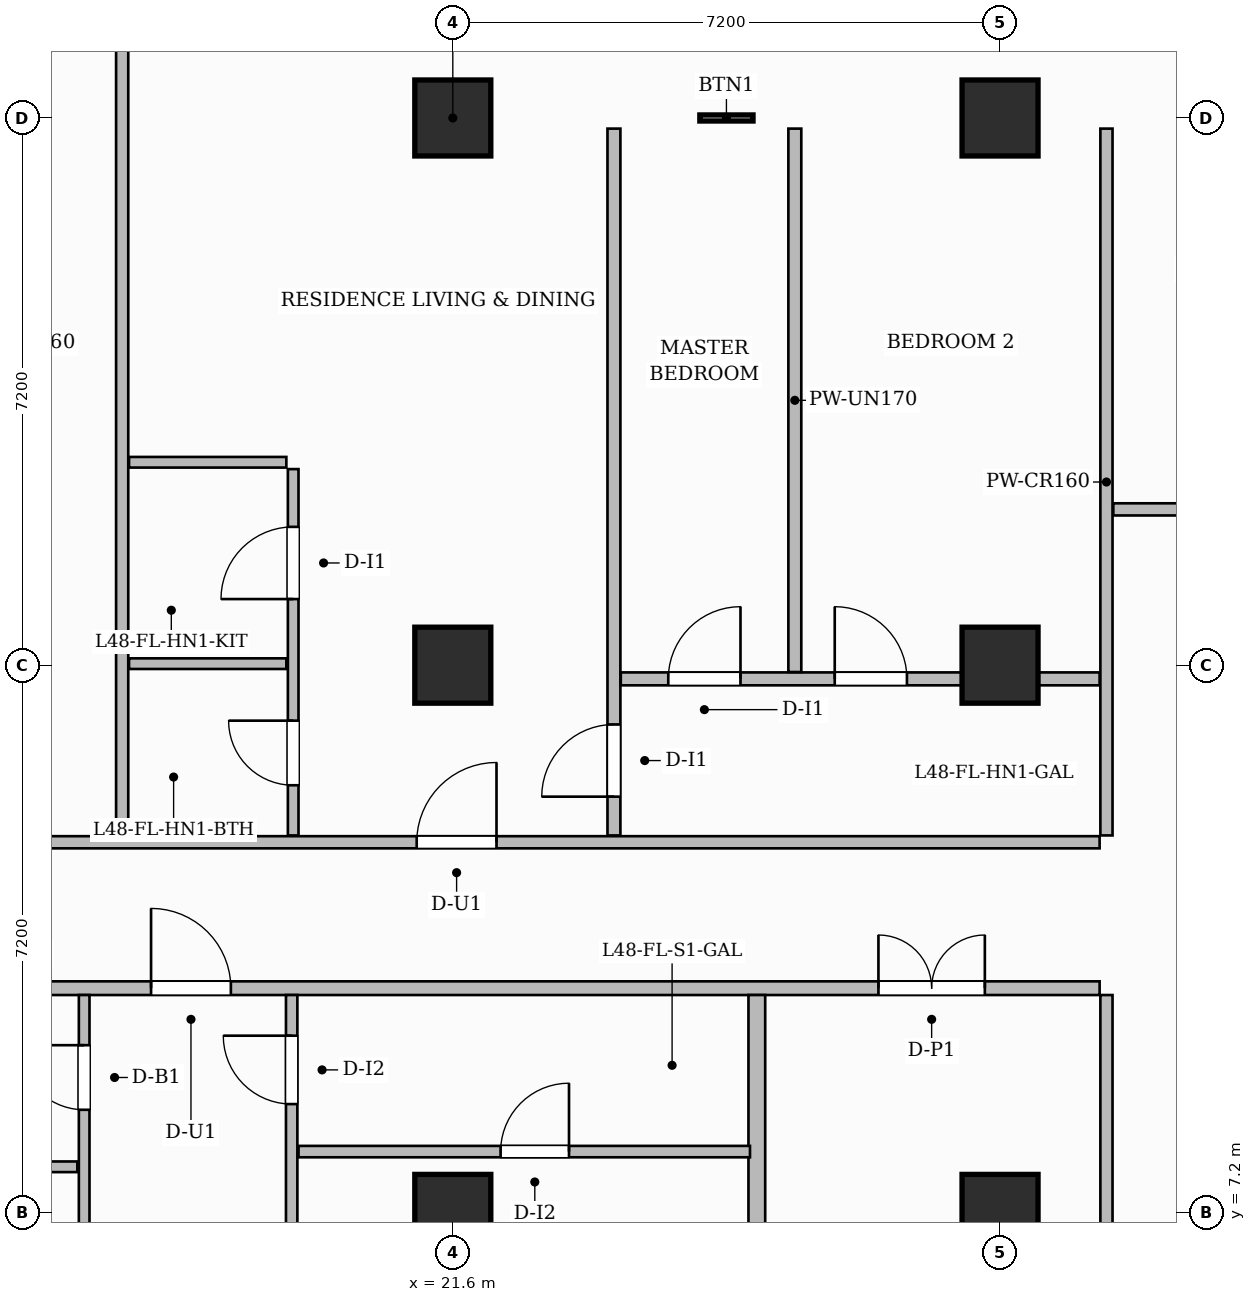
"""IFC4 building model, lengths in metres.
Left out: names, types, materials, properties, quantities, classifications, styles, units other than length and angle.
Written with IfcOpenShell. Run it as: python <this file> out.ifc"""

import sys

from ifc_helpers import new_model, si_unit, direction, frame, frame_2d, origin, origin_2d, place, context, subcontext, project, spatial, rectangle, extrude, source, transform, mapped, element, fill, save


model = new_model("IFC4")
c1 = context("Model", 3, precision=1e-05, world=origin(), true_north=direction((0.0, 1.0)))
c2 = subcontext(c1, "Body", "Model", "MODEL_VIEW")
j1 = project(units=[si_unit("LENGTHUNIT", "METRE"), si_unit("PLANEANGLEUNIT", "RADIAN")], contexts=[c1])
p1 = place(None, origin())
s1 = spatial("IfcSite", under=j1, at=p1, CompositionType="ELEMENT")
p2 = place(p1, origin())
s2 = spatial("IfcBuilding", under=s1, at=p2, CompositionType="ELEMENT")
p3 = place(p2, frame((0.0, 0.0, 192.65)))
s3 = spatial("IfcBuildingStorey", under=s2, at=p3, CompositionType="ELEMENT", Elevation=192.65)
m1 = source(origin(), c2, "Body", "SweptSolid", [
    extrude(rectangle(XDim=1.0, YDim=1.0, at=origin_2d()), origin(), (0.0, 0.0, 1.0), 3.85),
])
for number, where, z_axis, x_axis in (
    (1, (21.6, 7.2, 0.0), (0.0, 0.0, 1.0), (1.0, 0.0, 0.0)),
    (2, (21.6, 14.4, 0.0), (0.0, 0.0, 1.0), (1.0, 0.0, 0.0)),
    (3, (21.6, 21.6, 0.0), (0.0, 0.0, 1.0), (1.0, 0.0, 0.0)),
    (4, (28.8, 7.2, 0.0), (0.0, 0.0, 1.0), (1.0, 0.0, 0.0)),
    (5, (28.8, 14.4, 0.0), (0.0, 0.0, 1.0), (1.0, 0.0, 0.0)),
    (6, (28.8, 21.6, 0.0), (0.0, 0.0, 1.0), (1.0, 0.0, 0.0)),
):
    element("IfcColumn", number, at=place(p3, frame(where, z_axis=z_axis, x_axis=x_axis)), inside=s3, PredefinedType="COLUMN", context=c2, shape_type="MappedRepresentation", body=[
        mapped(m1, transform((0.0, 0.0, 0.0), scale=1.0)),
    ])
p4 = place(p3, frame((14.568, 10.15, 0.0), z_axis=(0.0, 0.0, 1.0), x_axis=(1.0, 0.0, 0.0)))
e7 = element("IfcWall", 7, at=p4, inside=s3, PredefinedType="PARTITIONING", context=c2, shape_type="SweptSolid", body=[
    extrude(rectangle(XDim=15.542, YDim=0.18, at=frame_2d((7.771, 0.0))), origin(), (0.0, 0.0, 1.0), 3.55),
])
p5 = place(p4, frame((3.062, 0.0, 0.0)))
e8 = element("IfcOpeningElement", 8, at=p5, cuts=e7, PredefinedType="OPENING", context=c2, shape_type="SweptSolid", body=[
    extrude(rectangle(XDim=1.05, YDim=2.25, at=frame_2d((0.525, 1.125))), frame((0.0, 0.1, 0.0), z_axis=(0.0, -1.0, 0.0), x_axis=(1.0, 0.0, 0.0)), (0.0, 0.0, 1.0), 0.2),
])
p6 = place(p4, frame((12.632, 0.0, 0.0)))
e9 = element("IfcOpeningElement", 9, at=p6, cuts=e7, PredefinedType="OPENING", context=c2, shape_type="SweptSolid", body=[
    extrude(rectangle(XDim=1.4, YDim=2.35, at=frame_2d((0.7, 1.175))), frame((0.0, 0.1, 0.0), z_axis=(0.0, -1.0, 0.0), x_axis=(1.0, 0.0, 0.0)), (0.0, 0.0, 1.0), 0.2),
])
p7 = place(p3, frame((14.568, 12.07, 0.0), z_axis=(0.0, 0.0, 1.0), x_axis=(1.0, 0.0, 0.0)))
e10 = element("IfcWall", 10, at=p7, inside=s3, PredefinedType="PARTITIONING", context=c2, shape_type="SweptSolid", body=[
    extrude(rectangle(XDim=15.542, YDim=0.16, at=frame_2d((7.771, 0.0))), origin(), (0.0, 0.0, 1.0), 3.55),
])
p8 = place(p7, frame((6.557, 0.0, 0.0)))
e11 = element("IfcOpeningElement", 11, at=p8, cuts=e10, PredefinedType="OPENING", context=c2, shape_type="SweptSolid", body=[
    extrude(rectangle(XDim=1.05, YDim=2.25, at=frame_2d((0.525, 1.125))), frame((0.0, 0.09, 0.0), z_axis=(0.0, -1.0, 0.0), x_axis=(1.0, 0.0, 0.0)), (0.0, 0.0, 1.0), 0.18),
])
p9 = place(p3, frame((30.2, 12.16, 0.0), z_axis=(0.0, 0.0, 1.0), x_axis=(0.0, 1.0, 0.0)))
e12 = element("IfcWall", 12, at=p9, inside=s3, PredefinedType="PARTITIONING", context=c2, shape_type="SweptSolid", body=[
    extrude(rectangle(XDim=9.3, YDim=0.16, at=frame_2d((4.65, 0.0))), origin(), (0.0, 0.0, 1.0), 3.55),
])
p10 = place(p3, frame((30.29, 16.45, 0.0), z_axis=(0.0, 0.0, 1.0), x_axis=(1.0, 0.0, 0.0)))
e13 = element("IfcWall", 13, at=p10, inside=s3, PredefinedType="PARTITIONING", context=c2, shape_type="SweptSolid", body=[
    extrude(rectangle(XDim=19.37, YDim=0.16, at=frame_2d((9.685, 0.0))), origin(), (0.0, 0.0, 1.0), 3.55),
])
p11 = place(p10, frame((1.285, 0.0, 0.0)))
e14 = element("IfcOpeningElement", 14, at=p11, cuts=e13, PredefinedType="OPENING", context=c2, shape_type="SweptSolid", body=[
    extrude(rectangle(XDim=0.85, YDim=2.1, at=frame_2d((0.425, 1.05))), frame((0.0, 0.09, 0.0), z_axis=(0.0, -1.0, 0.0), x_axis=(1.0, 0.0, 0.0)), (0.0, 0.0, 1.0), 0.18),
])
p12 = place(p10, frame((10.66, 0.0, 0.0)))
e15 = element("IfcOpeningElement", 15, at=p12, cuts=e13, PredefinedType="OPENING", context=c2, shape_type="SweptSolid", body=[
    extrude(rectangle(XDim=1.6, YDim=2.4, at=frame_2d((0.8, 1.2))), frame((0.0, 0.09, 0.0), z_axis=(0.0, -1.0, 0.0), x_axis=(1.0, 0.0, 0.0)), (0.0, 0.0, 1.0), 0.18),
])
p13 = place(p3, frame((30.2, 0.168, 0.0), z_axis=(0.0, 0.0, 1.0), x_axis=(0.0, 1.0, 0.0)))
e16 = element("IfcWall", 16, at=p13, inside=s3, PredefinedType="PARTITIONING", context=c2, shape_type="SweptSolid", body=[
    extrude(rectangle(XDim=9.892, YDim=0.16, at=frame_2d((4.946, 0.0))), origin(), (0.0, 0.0, 1.0), 3.55),
])
p14 = place(p13, frame((1.957, 0.0, 0.0)))
e17 = element("IfcOpeningElement", 17, at=p14, cuts=e16, PredefinedType="OPENING", context=c2, shape_type="SweptSolid", body=[
    extrude(rectangle(XDim=1.05, YDim=2.15, at=frame_2d((0.525, 1.075))), frame((0.0, 0.09, 0.0), z_axis=(0.0, -1.0, 0.0), x_axis=(1.0, 0.0, 0.0)), (0.0, 0.0, 1.0), 0.18),
])
p15 = place(p3, frame((25.6, 0.168, 0.0), z_axis=(0.0, 0.0, 1.0), x_axis=(0.0, 1.0, 0.0)))
e18 = element("IfcWall", 18, at=p15, inside=s3, PredefinedType="PARTITIONING", context=c2, shape_type="SweptSolid", body=[
    extrude(rectangle(XDim=9.892, YDim=0.22, at=frame_2d((4.946, 0.0))), origin(), (0.0, 0.0, 1.0), 3.55),
])
p16 = place(p3, frame((16.75, 5.24, 0.0), z_axis=(0.0, 0.0, 1.0), x_axis=(0.0, 1.0, 0.0)))
e19 = element("IfcWall", 19, at=p16, inside=s3, PredefinedType="PARTITIONING", context=c2, shape_type="SweptSolid", body=[
    extrude(rectangle(XDim=4.82, YDim=0.14, at=frame_2d((2.41, 0.0))), origin(), (0.0, 0.0, 1.0), 3.55),
])
p17 = place(p16, frame((0.785, 0.0, 0.0)))
e20 = element("IfcOpeningElement", 20, at=p17, cuts=e19, PredefinedType="OPENING", context=c2, shape_type="SweptSolid", body=[
    extrude(rectangle(XDim=0.9, YDim=2.15, at=frame_2d((0.45, 1.075))), frame((0.0, 0.08, 0.0), z_axis=(0.0, -1.0, 0.0), x_axis=(1.0, 0.0, 0.0)), (0.0, 0.0, 1.0), 0.16),
])
p18 = place(p16, frame((3.31, 0.0, 0.0)))
e21 = element("IfcOpeningElement", 21, at=p18, cuts=e19, PredefinedType="OPENING", context=c2, shape_type="SweptSolid", body=[
    extrude(rectangle(XDim=0.85, YDim=2.1, at=frame_2d((0.425, 1.05))), frame((0.0, 0.08, 0.0), z_axis=(0.0, -1.0, 0.0), x_axis=(1.0, 0.0, 0.0)), (0.0, 0.0, 1.0), 0.16),
])
p19 = place(p3, frame((14.568, 7.8, 0.0), z_axis=(0.0, 0.0, 1.0), x_axis=(1.0, 0.0, 0.0)))
e22 = element("IfcWall", 22, at=p19, inside=s3, PredefinedType="PARTITIONING", context=c2, shape_type="SweptSolid", body=[
    extrude(rectangle(XDim=2.092, YDim=0.14, at=frame_2d((1.046, 0.0))), origin(), (0.0, 0.0, 1.0), 3.55),
])
p20 = place(p3, frame((19.48, 0.168, 0.0), z_axis=(0.0, 0.0, 1.0), x_axis=(0.0, 1.0, 0.0)))
e23 = element("IfcWall", 23, at=p20, inside=s3, PredefinedType="PARTITIONING", context=c2, shape_type="SweptSolid", body=[
    extrude(rectangle(XDim=9.892, YDim=0.15, at=frame_2d((4.946, 0.0))), origin(), (0.0, 0.0, 1.0), 3.55),
])
p21 = place(p20, frame((8.457, 0.0, 0.0)))
e24 = element("IfcOpeningElement", 24, at=p21, cuts=e23, PredefinedType="OPENING", context=c2, shape_type="SweptSolid", body=[
    extrude(rectangle(XDim=0.9, YDim=2.15, at=frame_2d((0.45, 1.075))), frame((0.0, 0.085, 0.0), z_axis=(0.0, -1.0, 0.0), x_axis=(1.0, 0.0, 0.0)), (0.0, 0.0, 1.0), 0.17),
])
p22 = place(p3, frame((19.57, 8.0, 0.0), z_axis=(0.0, 0.0, 1.0), x_axis=(1.0, 0.0, 0.0)))
e25 = element("IfcWall", 25, at=p22, inside=s3, PredefinedType="PARTITIONING", context=c2, shape_type="SweptSolid", body=[
    extrude(rectangle(XDim=5.94, YDim=0.15, at=frame_2d((2.97, 0.0))), origin(), (0.0, 0.0, 1.0), 3.55),
])
p23 = place(p22, frame((2.659, 0.0, 0.0)))
e26 = element("IfcOpeningElement", 26, at=p23, cuts=e25, PredefinedType="OPENING", context=c2, shape_type="SweptSolid", body=[
    extrude(rectangle(XDim=0.9, YDim=2.15, at=frame_2d((0.45, 1.075))), frame((0.0, 0.085, 0.0), z_axis=(0.0, -1.0, 0.0), x_axis=(1.0, 0.0, 0.0)), (0.0, 0.0, 1.0), 0.17),
])
p24 = place(p3, frame((17.25, 12.16, 0.0), z_axis=(0.0, 0.0, 1.0), x_axis=(0.0, 1.0, 0.0)))
e27 = element("IfcWall", 27, at=p24, inside=s3, PredefinedType="PARTITIONING", context=c2, shape_type="SweptSolid", body=[
    extrude(rectangle(XDim=12.95, YDim=0.16, at=frame_2d((6.475, 0.0))), origin(), (0.0, 0.0, 1.0), 3.55),
])
p25 = place(p3, frame((19.5, 12.16, 0.0), z_axis=(0.0, 0.0, 1.0), x_axis=(0.0, 1.0, 0.0)))
e28 = element("IfcWall", 28, at=p25, inside=s3, PredefinedType="PARTITIONING", context=c2, shape_type="SweptSolid", body=[
    extrude(rectangle(XDim=4.82, YDim=0.14, at=frame_2d((2.41, 0.0))), origin(), (0.0, 0.0, 1.0), 3.55),
])
p26 = place(p25, frame((0.66, 0.0, 0.0)))
e29 = element("IfcOpeningElement", 29, at=p26, cuts=e28, PredefinedType="OPENING", context=c2, shape_type="SweptSolid", body=[
    extrude(rectangle(XDim=0.85, YDim=2.1, at=frame_2d((0.425, 1.05))), frame((0.0, 0.08, 0.0), z_axis=(0.0, -1.0, 0.0), x_axis=(1.0, 0.0, 0.0)), (0.0, 0.0, 1.0), 0.16),
])
p27 = place(p25, frame((3.11, 0.0, 0.0)))
e30 = element("IfcOpeningElement", 30, at=p27, cuts=e28, PredefinedType="OPENING", context=c2, shape_type="SweptSolid", body=[
    extrude(rectangle(XDim=0.95, YDim=2.15, at=frame_2d((0.475, 1.075))), frame((0.0, 0.08, 0.0), z_axis=(0.0, -1.0, 0.0), x_axis=(1.0, 0.0, 0.0)), (0.0, 0.0, 1.0), 0.16),
])
p28 = place(p3, frame((17.34, 14.42, 0.0), z_axis=(0.0, 0.0, 1.0), x_axis=(1.0, 0.0, 0.0)))
e31 = element("IfcWall", 31, at=p28, inside=s3, PredefinedType="PARTITIONING", context=c2, shape_type="SweptSolid", body=[
    extrude(rectangle(XDim=2.07, YDim=0.14, at=frame_2d((1.035, 0.0))), origin(), (0.0, 0.0, 1.0), 3.035),
])
p29 = place(p3, frame((17.34, 17.07, 0.0), z_axis=(0.0, 0.0, 1.0), x_axis=(1.0, 0.0, 0.0)))
e32 = element("IfcWall", 32, at=p29, inside=s3, PredefinedType="PARTITIONING", context=c2, shape_type="SweptSolid", body=[
    extrude(rectangle(XDim=2.07, YDim=0.14, at=frame_2d((1.035, 0.0))), origin(), (0.0, 0.0, 1.0), 3.55),
])
p30 = place(p3, frame((23.72, 12.16, 0.0), z_axis=(0.0, 0.0, 1.0), x_axis=(0.0, 1.0, 0.0)))
e33 = element("IfcWall", 33, at=p30, inside=s3, PredefinedType="PARTITIONING", context=c2, shape_type="SweptSolid", body=[
    extrude(rectangle(XDim=9.3, YDim=0.17, at=frame_2d((4.65, 0.0))), origin(), (0.0, 0.0, 1.0), 3.55),
])
p31 = place(p30, frame((0.51, 0.0, 0.0)))
e34 = element("IfcOpeningElement", 34, at=p31, cuts=e33, PredefinedType="OPENING", context=c2, shape_type="SweptSolid", body=[
    extrude(rectangle(XDim=0.95, YDim=2.15, at=frame_2d((0.475, 1.075))), frame((0.0, 0.095, 0.0), z_axis=(0.0, -1.0, 0.0), x_axis=(1.0, 0.0, 0.0)), (0.0, 0.0, 1.0), 0.19),
])
p32 = place(p3, frame((23.81, 14.22, 0.0), z_axis=(0.0, 0.0, 1.0), x_axis=(1.0, 0.0, 0.0)))
e35 = element("IfcWall", 35, at=p32, inside=s3, PredefinedType="PARTITIONING", context=c2, shape_type="SweptSolid", body=[
    extrude(rectangle(XDim=6.3, YDim=0.17, at=frame_2d((3.15, 0.0))), origin(), (0.0, 0.0, 1.0), 2.935),
])
p33 = place(p32, frame((0.625, 0.0, 0.0)))
e36 = element("IfcOpeningElement", 36, at=p33, cuts=e35, PredefinedType="OPENING", context=c2, shape_type="SweptSolid", body=[
    extrude(rectangle(XDim=0.95, YDim=2.15, at=frame_2d((0.475, 1.075))), frame((0.0, 0.095, 0.0), z_axis=(0.0, -1.0, 0.0), x_axis=(1.0, 0.0, 0.0)), (0.0, 0.0, 1.0), 0.19),
])
p34 = place(p32, frame((2.815, 0.0, 0.0)))
e37 = element("IfcOpeningElement", 37, at=p34, cuts=e35, PredefinedType="OPENING", context=c2, shape_type="SweptSolid", body=[
    extrude(rectangle(XDim=0.95, YDim=2.15, at=frame_2d((0.475, 1.075))), frame((0.0, 0.095, 0.0), z_axis=(0.0, -1.0, 0.0), x_axis=(1.0, 0.0, 0.0)), (0.0, 0.0, 1.0), 0.19),
])
p35 = place(p3, frame((26.1, 14.31, 0.0), z_axis=(0.0, 0.0, 1.0), x_axis=(0.0, 1.0, 0.0)))
e38 = element("IfcWall", 38, at=p35, inside=s3, PredefinedType="PARTITIONING", context=c2, shape_type="SweptSolid", body=[
    extrude(rectangle(XDim=7.15, YDim=0.17, at=frame_2d((3.575, 0.0))), origin(), (0.0, 0.0, 1.0), 3.55),
])
m2 = source(origin(), c2, "Body", "SweptSolid", [
    extrude(rectangle(XDim=0.85, YDim=2.1, at=frame_2d((0.425, 1.05))), frame((0.0, 0.025, 0.0), z_axis=(0.0, -1.0, 0.0), x_axis=(1.0, 0.0, 0.0)), (0.0, 0.0, 1.0), 0.05),
])
p36 = place(p18, origin())
e39 = element("IfcDoor", 39, at=p36, inside=s3, OperationType="SINGLE_SWING_RIGHT", PredefinedType="DOOR", context=c2, shape_type="MappedRepresentation", body=[
    mapped(m2, transform((0.0, 0.0, 0.0), scale=1.0)),
])
fill(e21, e39)
m3 = source(origin(), c2, "Body", "SweptSolid", [
    extrude(rectangle(XDim=1.05, YDim=2.25, at=frame_2d((0.525, 1.125))), frame((0.0, 0.025, 0.0), z_axis=(0.0, -1.0, 0.0), x_axis=(1.0, 0.0, 0.0)), (0.0, 0.0, 1.0), 0.05),
])
p37 = place(p5, origin())
e40 = element("IfcDoor", 40, at=p37, inside=s3, OperationType="SINGLE_SWING_LEFT", PredefinedType="DOOR", context=c2, shape_type="MappedRepresentation", body=[
    mapped(m3, transform((0.0, 0.0, 0.0), scale=1.0)),
])
fill(e8, e40)
m4 = source(origin(), c2, "Body", "SweptSolid", [
    extrude(rectangle(XDim=0.9, YDim=2.15, at=frame_2d((0.45, 1.075))), frame((0.0, 0.025, 0.0), z_axis=(0.0, -1.0, 0.0), x_axis=(1.0, 0.0, 0.0)), (0.0, 0.0, 1.0), 0.05),
])
p38 = place(p21, origin())
e41 = element("IfcDoor", 41, at=p38, inside=s3, OperationType="SINGLE_SWING_RIGHT", PredefinedType="DOOR", context=c2, shape_type="MappedRepresentation", body=[
    mapped(m4, transform((0.0, 0.0, 0.0), scale=1.0)),
])
fill(e24, e41)
p39 = place(p23, origin())
e42 = element("IfcDoor", 42, at=p39, inside=s3, OperationType="SINGLE_SWING_RIGHT", PredefinedType="DOOR", context=c2, shape_type="MappedRepresentation", body=[
    mapped(m4, transform((0.0, 0.0, 0.0), scale=1.0)),
])
fill(e26, e42)
m5 = source(origin(), c2, "Body", "SweptSolid", [
    extrude(rectangle(XDim=1.4, YDim=2.35, at=frame_2d((0.7, 1.175))), frame((0.0, 0.025, 0.0), z_axis=(0.0, -1.0, 0.0), x_axis=(1.0, 0.0, 0.0)), (0.0, 0.0, 1.0), 0.05),
])
p40 = place(p6, origin())
e43 = element("IfcDoor", 43, at=p40, inside=s3, OperationType="DOUBLE_DOOR_SINGLE_SWING", PredefinedType="DOOR", context=c2, shape_type="MappedRepresentation", body=[
    mapped(m5, transform((0.0, 0.0, 0.0), scale=1.0)),
])
fill(e9, e43)
p41 = place(p26, origin())
e44 = element("IfcDoor", 44, at=p41, inside=s3, OperationType="SINGLE_SWING_RIGHT", PredefinedType="DOOR", context=c2, shape_type="MappedRepresentation", body=[
    mapped(m2, transform((0.0, 0.0, 0.0), scale=1.0)),
])
fill(e29, e44)
m6 = source(origin(), c2, "Body", "SweptSolid", [
    extrude(rectangle(XDim=0.95, YDim=2.15, at=frame_2d((0.475, 1.075))), frame((0.0, 0.025, 0.0), z_axis=(0.0, -1.0, 0.0), x_axis=(1.0, 0.0, 0.0)), (0.0, 0.0, 1.0), 0.05),
])
p42 = place(p27, origin())
e45 = element("IfcDoor", 45, at=p42, inside=s3, OperationType="SINGLE_SWING_LEFT", PredefinedType="DOOR", context=c2, shape_type="MappedRepresentation", body=[
    mapped(m6, transform((0.0, 0.0, 0.0), scale=1.0)),
])
fill(e30, e45)
p43 = place(p8, origin())
e46 = element("IfcDoor", 46, at=p43, inside=s3, OperationType="SINGLE_SWING_RIGHT", PredefinedType="DOOR", context=c2, shape_type="MappedRepresentation", body=[
    mapped(m3, transform((0.0, 0.0, 0.0), scale=1.0)),
])
fill(e11, e46)
p44 = place(p31, origin())
e47 = element("IfcDoor", 47, at=p44, inside=s3, OperationType="SINGLE_SWING_LEFT", PredefinedType="DOOR", context=c2, shape_type="MappedRepresentation", body=[
    mapped(m6, transform((0.0, 0.0, 0.0), scale=1.0)),
])
fill(e34, e47)
p45 = place(p33, origin())
e48 = element("IfcDoor", 48, at=p45, inside=s3, OperationType="SINGLE_SWING_RIGHT", PredefinedType="DOOR", context=c2, shape_type="MappedRepresentation", body=[
    mapped(m6, transform((0.0, 0.0, 0.0), scale=1.0)),
])
fill(e36, e48)
p46 = place(p34, origin())
e49 = element("IfcDoor", 49, at=p46, inside=s3, OperationType="SINGLE_SWING_LEFT", PredefinedType="DOOR", context=c2, shape_type="MappedRepresentation", body=[
    mapped(m6, transform((0.0, 0.0, 0.0), scale=1.0)),
])
fill(e37, e49)
save(model, sys.argv[1])
